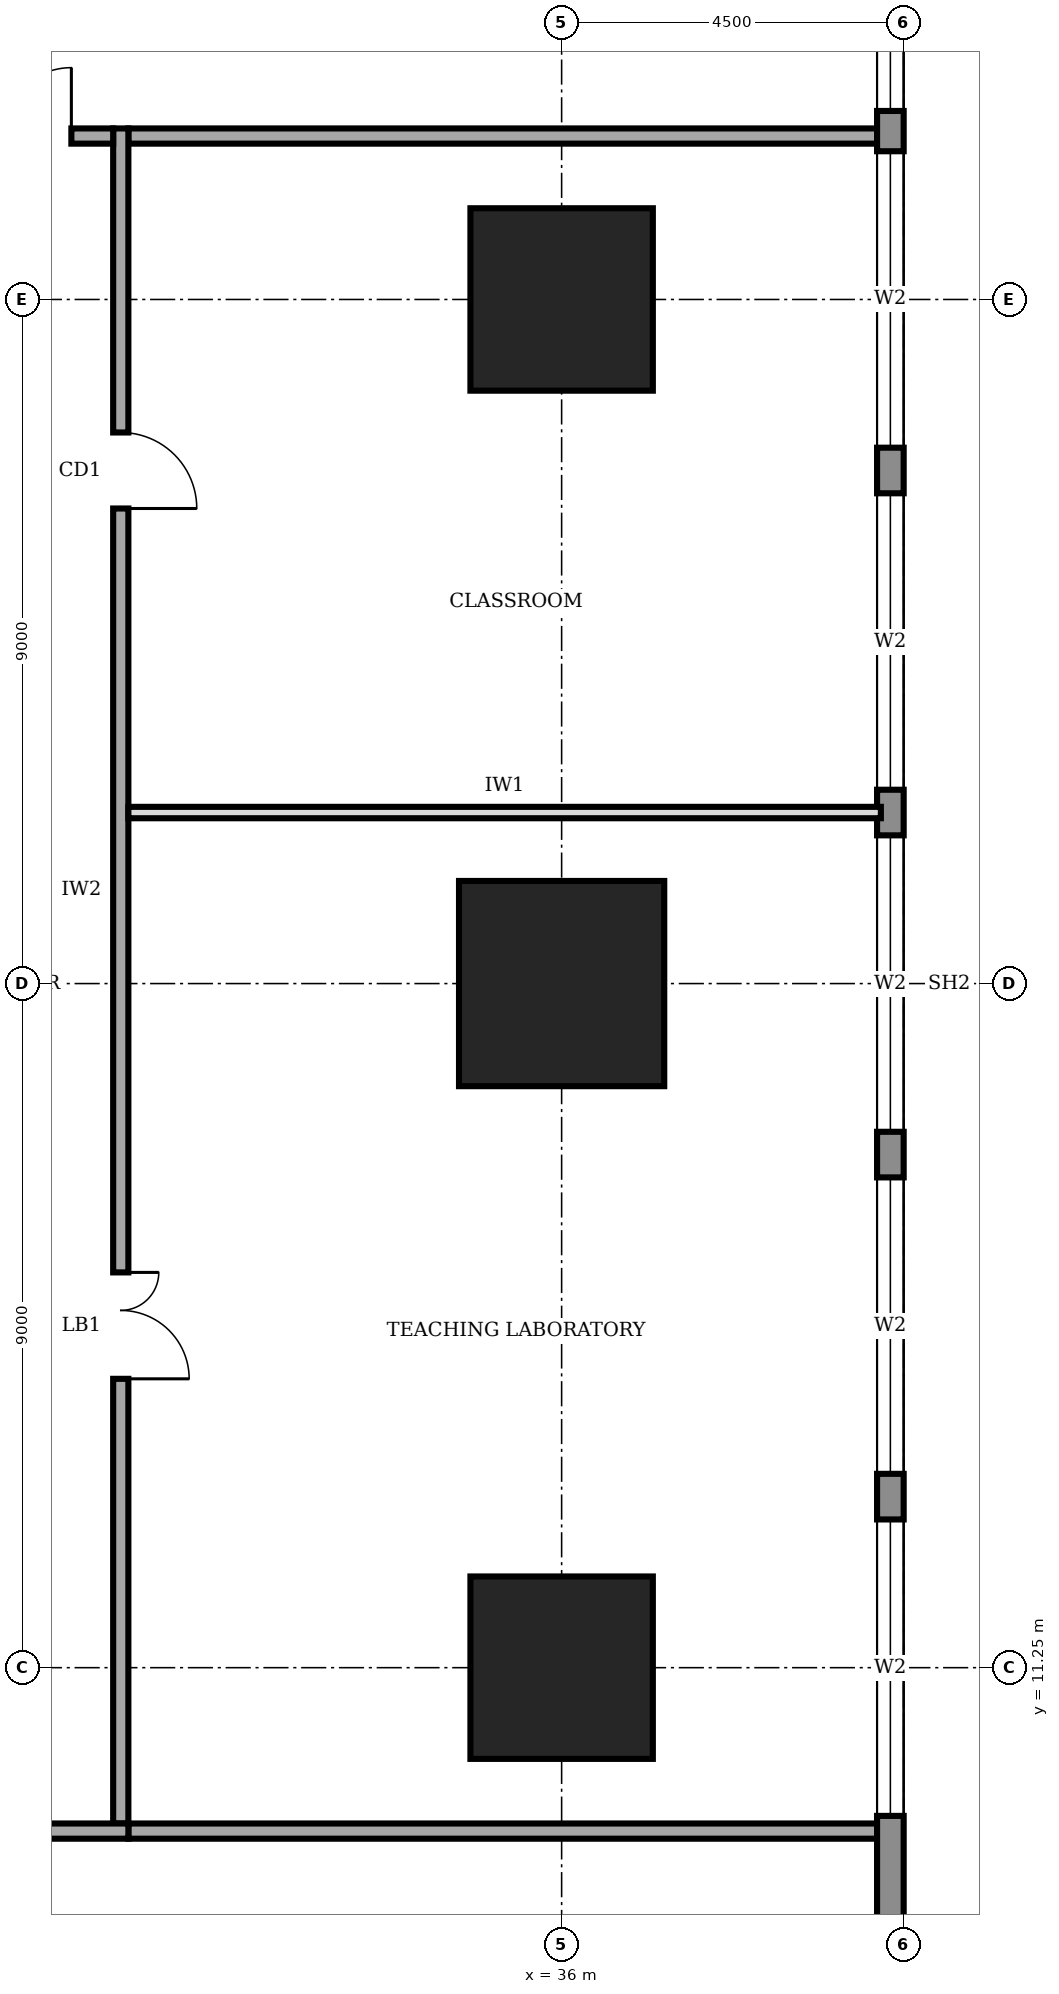
"""IFC4 building model, lengths in metres.
Left out: names, types, materials, properties, quantities, classifications, styles, units other than length and angle.
Written with IfcOpenShell. Run it as: python <this file> out.ifc"""

import sys

from ifc_helpers import new_model, si_unit, direction, frame, frame_2d, origin, origin_2d, place, context, subcontext, project, spatial, rectangle, extrude, element, fill, save


model = new_model("IFC4")
c1 = context("Model", 3, precision=1e-05, world=origin(), true_north=direction((0.0, 1.0)))
c2 = subcontext(c1, "Body", "Model", "MODEL_VIEW")
j1 = project(units=[si_unit("LENGTHUNIT", "METRE"), si_unit("PLANEANGLEUNIT", "RADIAN")], contexts=[c1])
p1 = place(None, origin())
s1 = spatial("IfcSite", under=j1, at=p1, CompositionType="ELEMENT")
p2 = place(p1, origin())
s2 = spatial("IfcBuilding", under=s1, at=p2, CompositionType="ELEMENT")
p3 = place(p2, frame((0.0, 0.0, 61.0)))
s3 = spatial("IfcBuildingStorey", under=s2, at=p3, CompositionType="ELEMENT", Elevation=61.0)
p4 = place(p3, frame((36.0, 11.25, 0.0), z_axis=(0.0, 0.0, 1.0), x_axis=(1.0, 0.0, 0.0)))
e1 = element("IfcColumn", 1, at=p4, inside=s3, PredefinedType="COLUMN", context=c2, shape_type="SweptSolid", body=[
    extrude(rectangle(XDim=2.4, YDim=2.4, at=origin_2d()), origin(), (0.0, 0.0, 1.0), 4.0),
])
p5 = place(p3, frame((36.0, 20.25, 0.0), z_axis=(0.0, 0.0, 1.0), x_axis=(1.0, 0.0, 0.0)))
e2 = element("IfcColumn", 2, at=p5, inside=s3, PredefinedType="COLUMN", context=c2, shape_type="SweptSolid", body=[
    extrude(rectangle(XDim=2.7, YDim=2.7, at=origin_2d()), origin(), (0.0, 0.0, 1.0), 4.0),
])
p6 = place(p3, frame((36.0, 29.25, 0.0), z_axis=(0.0, 0.0, 1.0), x_axis=(1.0, 0.0, 0.0)))
e3 = element("IfcColumn", 3, at=p6, inside=s3, PredefinedType="COLUMN", context=c2, shape_type="SweptSolid", body=[
    extrude(rectangle(XDim=2.4, YDim=2.4, at=origin_2d()), origin(), (0.0, 0.0, 1.0), 4.0),
])
p7 = place(p3, frame((40.325, 4.52, 0.0), z_axis=(0.0, 0.0, 1.0), x_axis=(0.0, 1.0, 0.0)))
e4 = element("IfcWall", 4, at=p7, inside=s3, PredefinedType="STANDARD", context=c2, shape_type="SweptSolid", body=[
    extrude(rectangle(XDim=31.46, YDim=0.35, at=frame_2d((15.73, 0.0))), origin(), (0.0, 0.0, 1.0), 3.75),
])
p8 = place(p7, frame((4.78, 0.0, 0.6)))
e5 = element("IfcOpeningElement", 5, at=p8, cuts=e4, PredefinedType="OPENING", context=c2, shape_type="SweptSolid", body=[
    extrude(rectangle(XDim=3.9, YDim=2.6, at=frame_2d((1.95, 1.3))), frame((0.0, 0.185, 0.0), z_axis=(0.0, -1.0, 0.0), x_axis=(1.0, 0.0, 0.0)), (0.0, 0.0, 1.0), 0.37),
])
p9 = place(p7, frame((9.28, 0.0, 0.6)))
e6 = element("IfcOpeningElement", 6, at=p9, cuts=e4, PredefinedType="OPENING", context=c2, shape_type="SweptSolid", body=[
    extrude(rectangle(XDim=3.9, YDim=2.6, at=frame_2d((1.95, 1.3))), frame((0.0, 0.185, 0.0), z_axis=(0.0, -1.0, 0.0), x_axis=(1.0, 0.0, 0.0)), (0.0, 0.0, 1.0), 0.37),
])
p10 = place(p7, frame((13.78, 0.0, 0.6)))
e7 = element("IfcOpeningElement", 7, at=p10, cuts=e4, PredefinedType="OPENING", context=c2, shape_type="SweptSolid", body=[
    extrude(rectangle(XDim=3.9, YDim=2.6, at=frame_2d((1.95, 1.3))), frame((0.0, 0.185, 0.0), z_axis=(0.0, -1.0, 0.0), x_axis=(1.0, 0.0, 0.0)), (0.0, 0.0, 1.0), 0.37),
])
p11 = place(p7, frame((18.28, 0.0, 0.6)))
e8 = element("IfcOpeningElement", 8, at=p11, cuts=e4, PredefinedType="OPENING", context=c2, shape_type="SweptSolid", body=[
    extrude(rectangle(XDim=3.9, YDim=2.6, at=frame_2d((1.95, 1.3))), frame((0.0, 0.185, 0.0), z_axis=(0.0, -1.0, 0.0), x_axis=(1.0, 0.0, 0.0)), (0.0, 0.0, 1.0), 0.37),
])
p12 = place(p7, frame((22.78, 0.0, 0.6)))
e9 = element("IfcOpeningElement", 9, at=p12, cuts=e4, PredefinedType="OPENING", context=c2, shape_type="SweptSolid", body=[
    extrude(rectangle(XDim=3.9, YDim=2.6, at=frame_2d((1.95, 1.3))), frame((0.0, 0.185, 0.0), z_axis=(0.0, -1.0, 0.0), x_axis=(1.0, 0.0, 0.0)), (0.0, 0.0, 1.0), 0.37),
])
p13 = place(p7, frame((27.21, 0.0, 0.6)))
e10 = element("IfcOpeningElement", 10, at=p13, cuts=e4, PredefinedType="OPENING", context=c2, shape_type="SweptSolid", body=[
    extrude(rectangle(XDim=3.9, YDim=2.6, at=frame_2d((1.95, 1.3))), frame((0.0, 0.185, 0.0), z_axis=(0.0, -1.0, 0.0), x_axis=(1.0, 0.0, 0.0)), (0.0, 0.0, 1.0), 0.37),
])
p14 = place(p3, frame((11.9, 9.1, 0.0), z_axis=(0.0, 0.0, 1.0), x_axis=(1.0, 0.0, 0.0)))
e11 = element("IfcWall", 11, at=p14, inside=s3, PredefinedType="SOLIDWALL", context=c2, shape_type="SweptSolid", body=[
    extrude(rectangle(XDim=18.4, YDim=0.2, at=frame_2d((9.2, 0.0))), origin(), (0.0, 0.0, 1.0), 3.75),
])
p15 = place(p14, frame((2.25, 0.0, 0.0)))
e12 = element("IfcOpeningElement", 12, at=p15, cuts=e11, PredefinedType="OPENING", context=c2, shape_type="SweptSolid", body=[
    extrude(rectangle(XDim=1.4, YDim=2.1, at=frame_2d((0.7, 1.05))), frame((0.0, 0.11, 0.0), z_axis=(0.0, -1.0, 0.0), x_axis=(1.0, 0.0, 0.0)), (0.0, 0.0, 1.0), 0.22),
])
p16 = place(p14, frame((7.85, 0.0, 0.0)))
e13 = element("IfcOpeningElement", 13, at=p16, cuts=e11, PredefinedType="OPENING", context=c2, shape_type="SweptSolid", body=[
    extrude(rectangle(XDim=1.0, YDim=2.1, at=frame_2d((0.5, 1.05))), frame((0.0, 0.11, 0.0), z_axis=(0.0, -1.0, 0.0), x_axis=(1.0, 0.0, 0.0)), (0.0, 0.0, 1.0), 0.22),
])
p17 = place(p14, frame((13.8, 0.0, 0.0)))
e14 = element("IfcOpeningElement", 14, at=p17, cuts=e11, PredefinedType="OPENING", context=c2, shape_type="SweptSolid", body=[
    extrude(rectangle(XDim=1.4, YDim=2.1, at=frame_2d((0.7, 1.05))), frame((0.0, 0.11, 0.0), z_axis=(0.0, -1.0, 0.0), x_axis=(1.0, 0.0, 0.0)), (0.0, 0.0, 1.0), 0.22),
])
p18 = place(p3, frame((30.2, 9.2, 0.0), z_axis=(0.0, 0.0, 1.0), x_axis=(0.0, 1.0, 0.0)))
e15 = element("IfcWall", 15, at=p18, inside=s3, PredefinedType="SOLIDWALL", context=c2, shape_type="SweptSolid", body=[
    extrude(rectangle(XDim=22.3, YDim=0.2, at=frame_2d((11.15, 0.0))), origin(), (0.0, 0.0, 1.0), 3.75),
])
p19 = place(p18, frame((5.85, 0.0, 0.0)))
e16 = element("IfcOpeningElement", 16, at=p19, cuts=e15, PredefinedType="OPENING", context=c2, shape_type="SweptSolid", body=[
    extrude(rectangle(XDim=1.4, YDim=2.1, at=frame_2d((0.7, 1.05))), frame((0.0, 0.11, 0.0), z_axis=(0.0, -1.0, 0.0), x_axis=(1.0, 0.0, 0.0)), (0.0, 0.0, 1.0), 0.22),
])
p20 = place(p18, frame((17.3, 0.0, 0.0)))
e17 = element("IfcOpeningElement", 17, at=p20, cuts=e15, PredefinedType="OPENING", context=c2, shape_type="SweptSolid", body=[
    extrude(rectangle(XDim=1.0, YDim=2.1, at=frame_2d((0.5, 1.05))), frame((0.0, 0.11, 0.0), z_axis=(0.0, -1.0, 0.0), x_axis=(1.0, 0.0, 0.0)), (0.0, 0.0, 1.0), 0.22),
])
p21 = place(p3, frame((30.1, 31.4, 0.0), z_axis=(0.0, 0.0, 1.0), x_axis=(-1.0, 0.0, 0.0)))
e18 = element("IfcWall", 18, at=p21, inside=s3, PredefinedType="SOLIDWALL", context=c2, shape_type="SweptSolid", body=[
    extrude(rectangle(XDim=18.4, YDim=0.2, at=frame_2d((9.2, 0.0))), origin(), (0.0, 0.0, 1.0), 3.75),
])
p22 = place(p21, frame((14.55, 0.0, 0.0)))
e19 = element("IfcOpeningElement", 19, at=p22, cuts=e18, PredefinedType="OPENING", context=c2, shape_type="SweptSolid", body=[
    extrude(rectangle(XDim=1.4, YDim=2.1, at=frame_2d((0.7, 1.05))), frame((0.0, 0.11, 0.0), z_axis=(0.0, -1.0, 0.0), x_axis=(1.0, 0.0, 0.0)), (0.0, 0.0, 1.0), 0.22),
])
p23 = place(p21, frame((7.1, 0.0, 0.0)))
e20 = element("IfcOpeningElement", 20, at=p23, cuts=e18, PredefinedType="OPENING", context=c2, shape_type="SweptSolid", body=[
    extrude(rectangle(XDim=1.0, YDim=2.1, at=frame_2d((0.5, 1.05))), frame((0.0, 0.11, 0.0), z_axis=(0.0, -1.0, 0.0), x_axis=(1.0, 0.0, 0.0)), (0.0, 0.0, 1.0), 0.22),
])
p24 = place(p21, frame((0.55, 0.0, 0.0)))
e21 = element("IfcOpeningElement", 21, at=p24, cuts=e18, PredefinedType="OPENING", context=c2, shape_type="SweptSolid", body=[
    extrude(rectangle(XDim=1.8, YDim=2.1, at=frame_2d((0.9, 1.05))), frame((0.0, 0.11, 0.0), z_axis=(0.0, -1.0, 0.0), x_axis=(1.0, 0.0, 0.0)), (0.0, 0.0, 1.0), 0.22),
])
for number, where, z_axis, x_axis in (
    (22, (30.3, 9.1, 0.0), (0.0, 0.0, 1.0), (1.0, 0.0, 0.0)),
    (23, (30.3, 31.4, 0.0), (0.0, 0.0, 1.0), (1.0, 0.0, 0.0)),
):
    element("IfcWall", number, at=place(p3, frame(where, z_axis=z_axis, x_axis=x_axis)), inside=s3, PredefinedType="SOLIDWALL", context=c2, shape_type="SweptSolid", body=[
        extrude(rectangle(XDim=9.9, YDim=0.2, at=frame_2d((4.95, 0.0))), origin(), (0.0, 0.0, 1.0), 3.75),
    ])
p25 = place(p3, frame((30.3, 22.5, 0.0), z_axis=(0.0, 0.0, 1.0), x_axis=(1.0, 0.0, 0.0)))
e24 = element("IfcWall", 24, at=p25, inside=s3, PredefinedType="PARTITIONING", context=c2, shape_type="SweptSolid", body=[
    extrude(rectangle(XDim=9.9, YDim=0.15, at=frame_2d((4.95, 0.0))), origin(), (0.0, 0.0, 1.0), 3.75),
])
p26 = place(p8, origin())
e25 = element("IfcWindow", 25, at=p26, inside=s3, PartitioningType="SINGLE_PANEL", PredefinedType="WINDOW", context=c2, shape_type="SweptSolid", body=[
    extrude(rectangle(XDim=3.9, YDim=2.6, at=frame_2d((1.95, 1.3))), frame((0.0, 0.03, 0.0), z_axis=(0.0, -1.0, 0.0), x_axis=(1.0, 0.0, 0.0)), (0.0, 0.0, 1.0), 0.06),
])
fill(e5, e25)
p27 = place(p9, origin())
e26 = element("IfcWindow", 26, at=p27, inside=s3, PartitioningType="SINGLE_PANEL", PredefinedType="WINDOW", context=c2, shape_type="SweptSolid", body=[
    extrude(rectangle(XDim=3.9, YDim=2.6, at=frame_2d((1.95, 1.3))), frame((0.0, 0.03, 0.0), z_axis=(0.0, -1.0, 0.0), x_axis=(1.0, 0.0, 0.0)), (0.0, 0.0, 1.0), 0.06),
])
fill(e6, e26)
p28 = place(p10, origin())
e27 = element("IfcWindow", 27, at=p28, inside=s3, PartitioningType="SINGLE_PANEL", PredefinedType="WINDOW", context=c2, shape_type="SweptSolid", body=[
    extrude(rectangle(XDim=3.9, YDim=2.6, at=frame_2d((1.95, 1.3))), frame((0.0, 0.03, 0.0), z_axis=(0.0, -1.0, 0.0), x_axis=(1.0, 0.0, 0.0)), (0.0, 0.0, 1.0), 0.06),
])
fill(e7, e27)
p29 = place(p11, origin())
e28 = element("IfcWindow", 28, at=p29, inside=s3, PartitioningType="SINGLE_PANEL", PredefinedType="WINDOW", context=c2, shape_type="SweptSolid", body=[
    extrude(rectangle(XDim=3.9, YDim=2.6, at=frame_2d((1.95, 1.3))), frame((0.0, 0.03, 0.0), z_axis=(0.0, -1.0, 0.0), x_axis=(1.0, 0.0, 0.0)), (0.0, 0.0, 1.0), 0.06),
])
fill(e8, e28)
p30 = place(p12, origin())
e29 = element("IfcWindow", 29, at=p30, inside=s3, PartitioningType="SINGLE_PANEL", PredefinedType="WINDOW", context=c2, shape_type="SweptSolid", body=[
    extrude(rectangle(XDim=3.9, YDim=2.6, at=frame_2d((1.95, 1.3))), frame((0.0, 0.03, 0.0), z_axis=(0.0, -1.0, 0.0), x_axis=(1.0, 0.0, 0.0)), (0.0, 0.0, 1.0), 0.06),
])
fill(e9, e29)
p31 = place(p13, origin())
e30 = element("IfcWindow", 30, at=p31, inside=s3, PartitioningType="SINGLE_PANEL", PredefinedType="WINDOW", context=c2, shape_type="SweptSolid", body=[
    extrude(rectangle(XDim=3.9, YDim=2.6, at=frame_2d((1.95, 1.3))), frame((0.0, 0.03, 0.0), z_axis=(0.0, -1.0, 0.0), x_axis=(1.0, 0.0, 0.0)), (0.0, 0.0, 1.0), 0.06),
])
fill(e10, e30)
p32 = place(p19, frame((1.4, 0.0, 0.0), z_axis=(0.0, 0.0, 1.0), x_axis=(-1.0, 0.0, 0.0)))
e31 = element("IfcDoor", 31, at=p32, inside=s3, OperationType="DOUBLE_DOOR_SINGLE_SWING", PredefinedType="DOOR", context=c2, shape_type="SweptSolid", body=[
    extrude(rectangle(XDim=1.4, YDim=2.1, at=frame_2d((0.7, 1.05))), frame((0.0, 0.025, 0.0), z_axis=(0.0, -1.0, 0.0), x_axis=(1.0, 0.0, 0.0)), (0.0, 0.0, 1.0), 0.05),
])
fill(e16, e31)
p33 = place(p20, frame((1.0, 0.0, 0.0), z_axis=(0.0, 0.0, 1.0), x_axis=(-1.0, 0.0, 0.0)))
e32 = element("IfcDoor", 32, at=p33, inside=s3, OperationType="SINGLE_SWING_RIGHT", PredefinedType="DOOR", context=c2, shape_type="SweptSolid", body=[
    extrude(rectangle(XDim=1.0, YDim=2.1, at=frame_2d((0.5, 1.05))), frame((0.0, 0.025, 0.0), z_axis=(0.0, -1.0, 0.0), x_axis=(1.0, 0.0, 0.0)), (0.0, 0.0, 1.0), 0.05),
])
fill(e17, e32)
p34 = place(p24, frame((1.8, 0.0, 0.0), z_axis=(0.0, 0.0, 1.0), x_axis=(-1.0, 0.0, 0.0)))
e33 = element("IfcDoor", 33, at=p34, inside=s3, OperationType="DOUBLE_DOOR_SINGLE_SWING", PredefinedType="DOOR", context=c2, shape_type="SweptSolid", body=[
    extrude(rectangle(XDim=1.8, YDim=2.1, at=frame_2d((0.9, 1.05))), frame((0.0, 0.025, 0.0), z_axis=(0.0, -1.0, 0.0), x_axis=(1.0, 0.0, 0.0)), (0.0, 0.0, 1.0), 0.05),
])
fill(e21, e33)
save(model, sys.argv[1])
